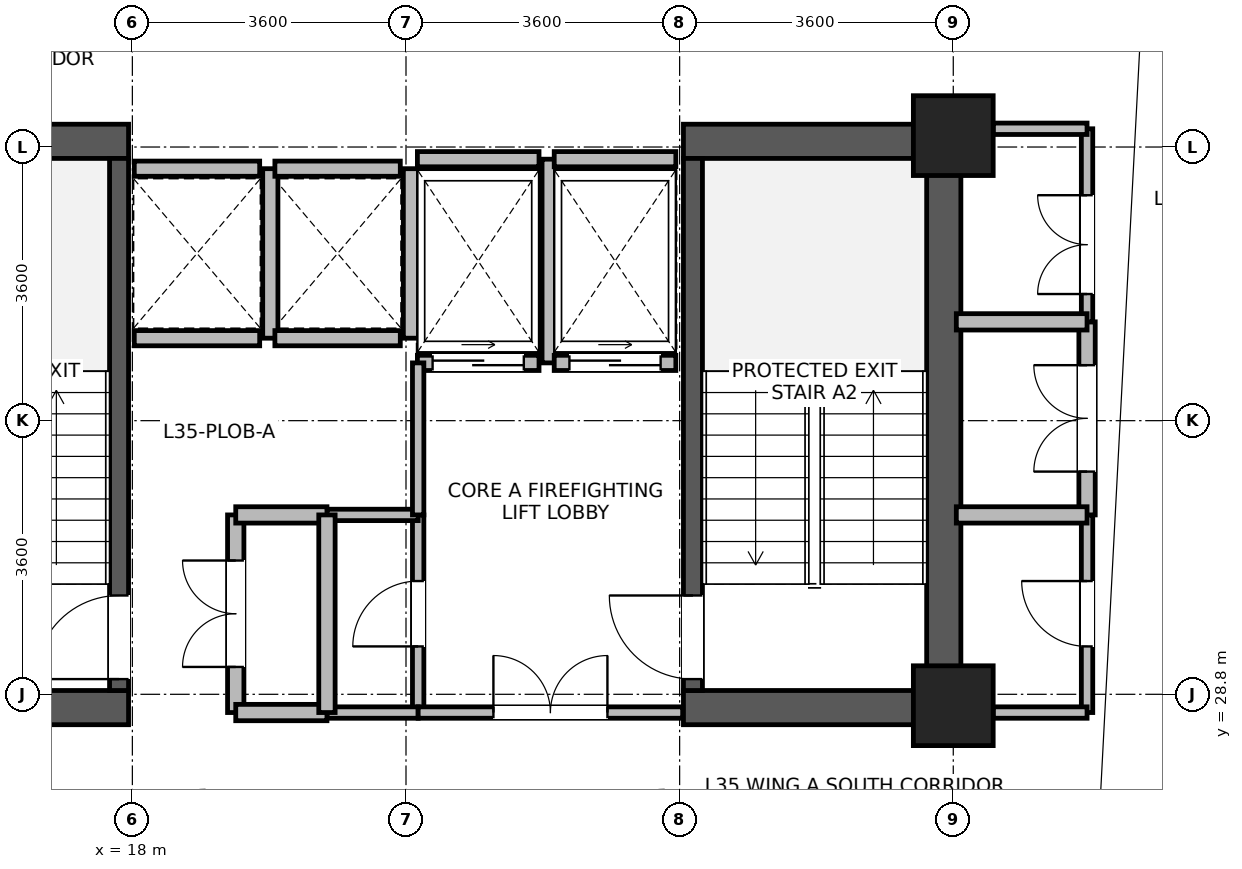
"""IFC4 building model, lengths in metres.
Left out: names, types, materials, properties, quantities, classifications, styles, units other than length and angle.
Written with IfcOpenShell. Run it as: python <this file> out.ifc"""

import sys

from ifc_helpers import new_model, si_unit, direction, frame, frame_2d, origin, origin_2d, place, context, subcontext, project, spatial, rectangle, extrude, source, transform, mapped, element, fill, save


model = new_model("IFC4")
c1 = context("Model", 3, precision=1e-05, world=origin(), true_north=direction((0.0, 1.0)))
c2 = subcontext(c1, "Body", "Model", "MODEL_VIEW")
j1 = project(units=[si_unit("LENGTHUNIT", "METRE"), si_unit("PLANEANGLEUNIT", "RADIAN")], contexts=[c1])
p1 = place(None, origin())
s1 = spatial("IfcSite", under=j1, at=p1, CompositionType="ELEMENT")
p2 = place(p1, origin())
s2 = spatial("IfcBuilding", under=s1, at=p2, CompositionType="ELEMENT")
p3 = place(p2, frame((0.0, 0.0, 140.2)))
s3 = spatial("IfcBuildingStorey", under=s2, at=p3, CompositionType="ELEMENT", Elevation=140.2)
p4 = place(p3, frame((28.675, 28.4, 0.0), z_axis=(0.0, 0.0, 1.0), x_axis=(0.0, 1.0, 0.0)))
e1 = element("IfcWall", 1, at=p4, inside=s3, PredefinedType="SHEAR", context=c2, shape_type="SweptSolid", body=[
    extrude(rectangle(XDim=7.9, YDim=0.45, at=frame_2d((3.95, 0.0))), origin(), (0.0, 0.0, 1.0), 3.46),
])
for number, where, z_axis, x_axis in (
    (2, (14.75, 28.625, 0.0), (0.0, 0.0, 1.0), (1.0, 0.0, 0.0)),
    (3, (25.25, 28.625, 0.0), (0.0, 0.0, 1.0), (1.0, 0.0, 0.0)),
    (4, (14.75, 36.075, 0.0), (0.0, 0.0, 1.0), (1.0, 0.0, 0.0)),
    (5, (25.25, 36.075, 0.0), (0.0, 0.0, 1.0), (1.0, 0.0, 0.0)),
):
    element("IfcWall", number, at=place(p3, frame(where, z_axis=z_axis, x_axis=x_axis)), inside=s3, PredefinedType="SHEAR", context=c2, shape_type="SweptSolid", body=[
        extrude(rectangle(XDim=3.2, YDim=0.45, at=frame_2d((1.6, 0.0))), origin(), (0.0, 0.0, 1.0), 3.46),
    ])
p5 = place(p3, frame((17.825, 28.85, 0.0), z_axis=(0.0, 0.0, 1.0), x_axis=(0.0, 1.0, 0.0)))
e6 = element("IfcWall", 6, at=p5, inside=s3, PredefinedType="SHEAR", context=c2, shape_type="SweptSolid", body=[
    extrude(rectangle(XDim=7.0, YDim=0.25, at=frame_2d((3.5, 0.0))), origin(), (0.0, 0.0, 1.0), 3.46),
])
p6 = place(p5, frame((0.15, 0.0, 0.0)))
e7 = element("IfcOpeningElement", 7, at=p6, cuts=e6, PredefinedType="OPENING", context=c2, shape_type="SweptSolid", body=[
    extrude(rectangle(XDim=1.1, YDim=2.08, at=frame_2d((0.55, 1.04))), frame((0.0, 0.135, 0.0), z_axis=(0.0, -1.0, 0.0), x_axis=(1.0, 0.0, 0.0)), (0.0, 0.0, 1.0), 0.27),
])
p7 = place(p3, frame((25.375, 28.85, 0.0), z_axis=(0.0, 0.0, 1.0), x_axis=(0.0, 1.0, 0.0)))
e8 = element("IfcWall", 8, at=p7, inside=s3, PredefinedType="SHEAR", context=c2, shape_type="SweptSolid", body=[
    extrude(rectangle(XDim=7.0, YDim=0.25, at=frame_2d((3.5, 0.0))), origin(), (0.0, 0.0, 1.0), 3.46),
])
p8 = place(p7, frame((0.15, 0.0, 0.0)))
e9 = element("IfcOpeningElement", 9, at=p8, cuts=e8, PredefinedType="OPENING", context=c2, shape_type="SweptSolid", body=[
    extrude(rectangle(XDim=1.1, YDim=2.08, at=frame_2d((0.55, 1.04))), frame((0.0, 0.135, 0.0), z_axis=(0.0, -1.0, 0.0), x_axis=(1.0, 0.0, 0.0)), (0.0, 0.0, 1.0), 0.27),
])
m1 = source(origin(), c2, "Body", "SweptSolid", [
    extrude(rectangle(XDim=1.05, YDim=1.05, at=origin_2d()), origin(), (0.0, 0.0, 1.0), 3.7),
])
for number, where, z_axis, x_axis in (
    (10, (28.8, 28.65, 0.0), (0.0, 0.0, 1.0), (1.0, 0.0, 0.0)),
    (11, (28.8, 36.15, 0.0), (0.0, 0.0, 1.0), (1.0, 0.0, 0.0)),
):
    element("IfcColumn", number, at=place(p3, frame(where, z_axis=z_axis, x_axis=x_axis)), inside=s3, PredefinedType="COLUMN", context=c2, shape_type="MappedRepresentation", body=[
        mapped(m1, transform((0.0, 0.0, 0.0), x_axis=(1.0, 0.0, 0.0), y_axis=(0.0, 1.0, 0.0), z_axis=(0.0, 0.0, 1.0), scale=1.0)),
    ])
p9 = place(p3, frame((18.025, 33.485, 0.0), z_axis=(0.0, 0.0, 1.0), x_axis=(1.0, 0.0, 0.0)))
e12 = element("IfcWall", 12, at=p9, inside=s3, PredefinedType="PARTITIONING", context=c2, shape_type="SweptSolid", body=[
    extrude(rectangle(XDim=1.65, YDim=0.2, at=frame_2d((0.825, 0.0))), origin(), (0.0, 0.0, 1.0), 3.44),
])
p10 = place(p3, frame((18.025, 35.715, 0.0), z_axis=(0.0, 0.0, 1.0), x_axis=(1.0, 0.0, 0.0)))
e13 = element("IfcWall", 13, at=p10, inside=s3, PredefinedType="PARTITIONING", context=c2, shape_type="SweptSolid", body=[
    extrude(rectangle(XDim=1.65, YDim=0.2, at=frame_2d((0.825, 0.0))), origin(), (0.0, 0.0, 1.0), 2.44),
])
p11 = place(p3, frame((19.815, 33.485, 0.0), z_axis=(0.0, 0.0, 1.0), x_axis=(0.0, 1.0, 0.0)))
e14 = element("IfcWall", 14, at=p11, inside=s3, PredefinedType="PARTITIONING", context=c2, shape_type="SweptSolid", body=[
    extrude(rectangle(XDim=2.23, YDim=0.2, at=frame_2d((1.115, 0.0))), origin(), (0.0, 0.0, 1.0), 3.44),
])
p12 = place(p3, frame((19.875, 33.485, 0.0), z_axis=(0.0, 0.0, 1.0), x_axis=(1.0, 0.0, 0.0)))
e15 = element("IfcWall", 15, at=p12, inside=s3, PredefinedType="PARTITIONING", context=c2, shape_type="SweptSolid", body=[
    extrude(rectangle(XDim=1.65, YDim=0.2, at=frame_2d((0.825, 0.0))), origin(), (0.0, 0.0, 1.0), 3.44),
])
p13 = place(p3, frame((19.875, 35.715, 0.0), z_axis=(0.0, 0.0, 1.0), x_axis=(1.0, 0.0, 0.0)))
e16 = element("IfcWall", 16, at=p13, inside=s3, PredefinedType="PARTITIONING", context=c2, shape_type="SweptSolid", body=[
    extrude(rectangle(XDim=1.65, YDim=0.2, at=frame_2d((0.825, 0.0))), origin(), (0.0, 0.0, 1.0), 2.44),
])
p14 = place(p3, frame((21.665, 33.485, 0.0), z_axis=(0.0, 0.0, 1.0), x_axis=(0.0, 1.0, 0.0)))
e17 = element("IfcWall", 17, at=p14, inside=s3, PredefinedType="PARTITIONING", context=c2, shape_type="SweptSolid", body=[
    extrude(rectangle(XDim=2.23, YDim=0.2, at=frame_2d((1.115, 0.0))), origin(), (0.0, 0.0, 1.0), 3.44),
])
p15 = place(p3, frame((21.75, 33.16, 0.0), z_axis=(0.0, 0.0, 1.0), x_axis=(1.0, 0.0, 0.0)))
e18 = element("IfcWall", 18, at=p15, inside=s3, PredefinedType="PARTITIONING", context=c2, shape_type="SweptSolid", body=[
    extrude(rectangle(XDim=1.6, YDim=0.2, at=frame_2d((0.8, 0.0))), origin(), (0.0, 0.0, 1.0), 3.44),
])
p16 = place(p15, frame((0.2, 0.0, 0.0)))
e19 = element("IfcOpeningElement", 19, at=p16, cuts=e18, PredefinedType="OPENING", context=c2, shape_type="SweptSolid", body=[
    extrude(rectangle(XDim=1.2, YDim=2.12, at=frame_2d((0.6, 1.06))), frame((0.0, 0.11, 0.0), z_axis=(0.0, -1.0, 0.0), x_axis=(1.0, 0.0, 0.0)), (0.0, 0.0, 1.0), 0.22),
])
p17 = place(p3, frame((21.75, 35.84, 0.0), z_axis=(0.0, 0.0, 1.0), x_axis=(1.0, 0.0, 0.0)))
e20 = element("IfcWall", 20, at=p17, inside=s3, PredefinedType="PARTITIONING", context=c2, shape_type="SweptSolid", body=[
    extrude(rectangle(XDim=1.6, YDim=0.2, at=frame_2d((0.8, 0.0))), origin(), (0.0, 0.0, 1.0), 2.44),
])
p18 = place(p3, frame((23.49, 33.16, 0.0), z_axis=(0.0, 0.0, 1.0), x_axis=(0.0, 1.0, 0.0)))
e21 = element("IfcWall", 21, at=p18, inside=s3, PredefinedType="PARTITIONING", context=c2, shape_type="SweptSolid", body=[
    extrude(rectangle(XDim=2.68, YDim=0.2, at=frame_2d((1.34, 0.0))), origin(), (0.0, 0.0, 1.0), 3.44),
])
p19 = place(p3, frame((23.55, 33.16, 0.0), z_axis=(0.0, 0.0, 1.0), x_axis=(1.0, 0.0, 0.0)))
e22 = element("IfcWall", 22, at=p19, inside=s3, PredefinedType="PARTITIONING", context=c2, shape_type="SweptSolid", body=[
    extrude(rectangle(XDim=1.6, YDim=0.2, at=frame_2d((0.8, 0.0))), origin(), (0.0, 0.0, 1.0), 3.44),
])
p20 = place(p19, frame((0.2, 0.0, 0.0)))
e23 = element("IfcOpeningElement", 23, at=p20, cuts=e22, PredefinedType="OPENING", context=c2, shape_type="SweptSolid", body=[
    extrude(rectangle(XDim=1.2, YDim=2.12, at=frame_2d((0.6, 1.06))), frame((0.0, 0.11, 0.0), z_axis=(0.0, -1.0, 0.0), x_axis=(1.0, 0.0, 0.0)), (0.0, 0.0, 1.0), 0.22),
])
p21 = place(p3, frame((23.55, 35.84, 0.0), z_axis=(0.0, 0.0, 1.0), x_axis=(1.0, 0.0, 0.0)))
e24 = element("IfcWall", 24, at=p21, inside=s3, PredefinedType="PARTITIONING", context=c2, shape_type="SweptSolid", body=[
    extrude(rectangle(XDim=1.6, YDim=0.2, at=frame_2d((0.8, 0.0))), origin(), (0.0, 0.0, 1.0), 2.44),
])
p22 = place(p3, frame((19.36, 28.56, 0.0), z_axis=(0.0, 0.0, 1.0), x_axis=(0.0, 1.0, 0.0)))
e25 = element("IfcWall", 25, at=p22, inside=s3, PredefinedType="PARTITIONING", context=c2, shape_type="SweptSolid", body=[
    extrude(rectangle(XDim=2.6, YDim=0.215, at=frame_2d((1.3, 0.0))), origin(), (0.0, 0.0, 1.0), 3.44),
])
p23 = place(p22, frame((0.6, 0.0, 0.0)))
e26 = element("IfcOpeningElement", 26, at=p23, cuts=e25, PredefinedType="OPENING", context=c2, shape_type="SweptSolid", body=[
    extrude(rectangle(XDim=1.4, YDim=2.15, at=frame_2d((0.7, 1.075))), frame((0.0, 0.118, 0.0), z_axis=(0.0, -1.0, 0.0), x_axis=(1.0, 0.0, 0.0)), (0.0, 0.0, 1.0), 0.235),
])
p24 = place(p3, frame((21.76, 28.56, 0.0), z_axis=(0.0, 0.0, 1.0), x_axis=(0.0, 1.0, 0.0)))
e27 = element("IfcWall", 27, at=p24, inside=s3, PredefinedType="PARTITIONING", context=c2, shape_type="SweptSolid", body=[
    extrude(rectangle(XDim=2.6, YDim=0.15, at=frame_2d((1.3, 0.0))), origin(), (0.0, 0.0, 1.0), 3.44),
])
p25 = place(p24, frame((0.87, 0.0, 0.0)))
e28 = element("IfcOpeningElement", 28, at=p25, cuts=e27, PredefinedType="OPENING", context=c2, shape_type="SweptSolid", body=[
    extrude(rectangle(XDim=0.86, YDim=2.02, at=frame_2d((0.43, 1.01))), frame((0.0, 0.085, 0.0), z_axis=(0.0, -1.0, 0.0), x_axis=(1.0, 0.0, 0.0)), (0.0, 0.0, 1.0), 0.17),
])
p26 = place(p3, frame((30.56, 28.56, 0.0), z_axis=(0.0, 0.0, 1.0), x_axis=(0.0, 1.0, 0.0)))
e29 = element("IfcWall", 29, at=p26, inside=s3, PredefinedType="PARTITIONING", context=c2, shape_type="SweptSolid", body=[
    extrude(rectangle(XDim=2.6, YDim=0.15, at=frame_2d((1.3, 0.0))), origin(), (0.0, 0.0, 1.0), 3.44),
])
p27 = place(p26, frame((0.87, 0.0, 0.0)))
e30 = element("IfcOpeningElement", 30, at=p27, cuts=e29, PredefinedType="OPENING", context=c2, shape_type="SweptSolid", body=[
    extrude(rectangle(XDim=0.86, YDim=2.02, at=frame_2d((0.43, 1.01))), frame((0.0, 0.085, 0.0), z_axis=(0.0, -1.0, 0.0), x_axis=(1.0, 0.0, 0.0)), (0.0, 0.0, 1.0), 0.17),
])
p28 = place(p3, frame((30.56, 31.16, 0.0), z_axis=(0.0, 0.0, 1.0), x_axis=(0.0, 1.0, 0.0)))
e31 = element("IfcWall", 31, at=p28, inside=s3, PredefinedType="PARTITIONING", context=c2, shape_type="SweptSolid", body=[
    extrude(rectangle(XDim=2.54, YDim=0.215, at=frame_2d((1.27, 0.0))), origin(), (0.0, 0.0, 1.0), 3.44),
])
p29 = place(p28, frame((0.57, 0.0, 0.0)))
e32 = element("IfcOpeningElement", 32, at=p29, cuts=e31, PredefinedType="OPENING", context=c2, shape_type="SweptSolid", body=[
    extrude(rectangle(XDim=1.4, YDim=2.15, at=frame_2d((0.7, 1.075))), frame((0.0, 0.118, 0.0), z_axis=(0.0, -1.0, 0.0), x_axis=(1.0, 0.0, 0.0)), (0.0, 0.0, 1.0), 0.235),
])
p30 = place(p3, frame((30.56, 33.7, 0.0), z_axis=(0.0, 0.0, 1.0), x_axis=(0.0, 1.0, 0.0)))
e33 = element("IfcWall", 33, at=p30, inside=s3, PredefinedType="PARTITIONING", context=c2, shape_type="SweptSolid", body=[
    extrude(rectangle(XDim=2.54, YDim=0.15, at=frame_2d((1.27, 0.0))), origin(), (0.0, 0.0, 1.0), 3.44),
])
p31 = place(p30, frame((0.366, 0.0, 0.0)))
e34 = element("IfcOpeningElement", 34, at=p31, cuts=e33, PredefinedType="OPENING", context=c2, shape_type="SweptSolid", body=[
    extrude(rectangle(XDim=1.3, YDim=2.12, at=frame_2d((0.65, 1.06))), frame((0.0, 0.085, 0.0), z_axis=(0.0, -1.0, 0.0), x_axis=(1.0, 0.0, 0.0)), (0.0, 0.0, 1.0), 0.17),
])
for number, where, z_axis, x_axis in (
    (35, (29.325, 28.56, 0.0), (0.0, 0.0, 1.0), (1.0, 0.0, 0.0)),
    (36, (29.325, 36.24, 0.0), (0.0, 0.0, 1.0), (1.0, 0.0, 0.0)),
):
    element("IfcWall", number, at=place(p3, frame(where, z_axis=z_axis, x_axis=x_axis)), inside=s3, PredefinedType="PARTITIONING", context=c2, shape_type="SweptSolid", body=[
        extrude(rectangle(XDim=1.235, YDim=0.15, at=frame_2d((0.618, 0.0))), origin(), (0.0, 0.0, 1.0), 2.84),
    ])
p32 = place(p3, frame((20.56, 28.56, 0.0), z_axis=(0.0, 0.0, 1.0), x_axis=(1.0, 0.0, 0.0)))
e37 = element("IfcWall", 37, at=p32, inside=s3, PredefinedType="PARTITIONING", context=c2, shape_type="SweptSolid", body=[
    extrude(rectangle(XDim=1.2, YDim=0.15, at=frame_2d((0.6, 0.0))), origin(), (0.0, 0.0, 1.0), 2.44),
])
p33 = place(p3, frame((20.56, 31.16, 0.0), z_axis=(0.0, 0.0, 1.0), x_axis=(1.0, 0.0, 0.0)))
e38 = element("IfcWall", 38, at=p33, inside=s3, PredefinedType="PARTITIONING", context=c2, shape_type="SweptSolid", body=[
    extrude(rectangle(XDim=1.2, YDim=0.15, at=frame_2d((0.6, 0.0))), origin(), (0.0, 0.0, 1.0), 3.44),
])
p34 = place(p3, frame((19.36, 28.56, 0.0), z_axis=(0.0, 0.0, 1.0), x_axis=(1.0, 0.0, 0.0)))
e39 = element("IfcWall", 39, at=p34, inside=s3, PredefinedType="PARTITIONING", context=c2, shape_type="SweptSolid", body=[
    extrude(rectangle(XDim=1.2, YDim=0.215, at=frame_2d((0.6, 0.0))), origin(), (0.0, 0.0, 1.0), 2.44),
])
p35 = place(p3, frame((19.36, 31.16, 0.0), z_axis=(0.0, 0.0, 1.0), x_axis=(1.0, 0.0, 0.0)))
e40 = element("IfcWall", 40, at=p35, inside=s3, PredefinedType="PARTITIONING", context=c2, shape_type="SweptSolid", body=[
    extrude(rectangle(XDim=1.2, YDim=0.215, at=frame_2d((0.6, 0.0))), origin(), (0.0, 0.0, 1.0), 3.44),
])
p36 = place(p3, frame((21.76, 28.56, 0.0), z_axis=(0.0, 0.0, 1.0), x_axis=(1.0, 0.0, 0.0)))
e41 = element("IfcWall", 41, at=p36, inside=s3, PredefinedType="PARTITIONING", context=c2, shape_type="SweptSolid", body=[
    extrude(rectangle(XDim=3.48, YDim=0.15, at=frame_2d((1.74, 0.0))), origin(), (0.0, 0.0, 1.0), 2.44),
])
p37 = place(p36, frame((0.99, 0.0, 0.0)))
e42 = element("IfcOpeningElement", 42, at=p37, cuts=e41, PredefinedType="OPENING", context=c2, shape_type="SweptSolid", body=[
    extrude(rectangle(XDim=1.5, YDim=2.1, at=frame_2d((0.75, 1.05))), frame((0.0, 0.085, 0.0), z_axis=(0.0, -1.0, 0.0), x_axis=(1.0, 0.0, 0.0)), (0.0, 0.0, 1.0), 0.17),
])
p38 = place(p3, frame((20.56, 28.56, 0.0), z_axis=(0.0, 0.0, 1.0), x_axis=(0.0, 1.0, 0.0)))
e43 = element("IfcWall", 43, at=p38, inside=s3, PredefinedType="PARTITIONING", context=c2, shape_type="SweptSolid", body=[
    extrude(rectangle(XDim=2.6, YDim=0.215, at=frame_2d((1.3, 0.0))), origin(), (0.0, 0.0, 1.0), 3.44),
])
p39 = place(p3, frame((21.76, 31.16, 0.0), z_axis=(0.0, 0.0, 1.0), x_axis=(0.0, 1.0, 0.0)))
e44 = element("IfcWall", 44, at=p39, inside=s3, PredefinedType="PARTITIONING", context=c2, shape_type="SweptSolid", body=[
    extrude(rectangle(XDim=2.0, YDim=0.15, at=frame_2d((1.0, 0.0))), origin(), (0.0, 0.0, 1.0), 3.44),
])
for number, where, z_axis, x_axis in (
    (45, (28.84, 31.16, 0.0), (0.0, 0.0, 1.0), (1.0, 0.0, 0.0)),
    (46, (28.84, 33.7, 0.0), (0.0, 0.0, 1.0), (1.0, 0.0, 0.0)),
):
    element("IfcWall", number, at=place(p3, frame(where, z_axis=z_axis, x_axis=x_axis)), inside=s3, PredefinedType="PARTITIONING", context=c2, shape_type="SweptSolid", body=[
        extrude(rectangle(XDim=1.72, YDim=0.215, at=frame_2d((0.86, 0.0))), origin(), (0.0, 0.0, 1.0), 3.44),
    ])
p40 = place(p6, origin())
e47 = element("IfcDoor", 47, at=p40, inside=s3, OperationType="SINGLE_SWING_LEFT", PredefinedType="DOOR", context=c2, shape_type="SweptSolid", body=[
    extrude(rectangle(XDim=1.1, YDim=2.08, at=frame_2d((0.55, 1.04))), frame((0.0, 0.025, 0.0), z_axis=(0.0, -1.0, 0.0), x_axis=(1.0, 0.0, 0.0)), (0.0, 0.0, 1.0), 0.05),
])
fill(e7, e47)
p41 = place(p8, origin())
e48 = element("IfcDoor", 48, at=p41, inside=s3, OperationType="SINGLE_SWING_RIGHT", PredefinedType="DOOR", context=c2, shape_type="SweptSolid", body=[
    extrude(rectangle(XDim=1.1, YDim=2.08, at=frame_2d((0.55, 1.04))), frame((0.0, 0.025, 0.0), z_axis=(0.0, -1.0, 0.0), x_axis=(1.0, 0.0, 0.0)), (0.0, 0.0, 1.0), 0.05),
])
fill(e9, e48)
p42 = place(p16, origin())
e49 = element("IfcDoor", 49, at=p42, inside=s3, OperationType="SLIDING_TO_RIGHT", PredefinedType="DOOR", context=c2, shape_type="SweptSolid", body=[
    extrude(rectangle(XDim=1.2, YDim=2.12, at=frame_2d((0.6, 1.06))), frame((0.0, 0.025, 0.0), z_axis=(0.0, -1.0, 0.0), x_axis=(1.0, 0.0, 0.0)), (0.0, 0.0, 1.0), 0.05),
])
fill(e19, e49)
p43 = place(p20, origin())
e50 = element("IfcDoor", 50, at=p43, inside=s3, OperationType="SLIDING_TO_RIGHT", PredefinedType="DOOR", context=c2, shape_type="SweptSolid", body=[
    extrude(rectangle(XDim=1.2, YDim=2.12, at=frame_2d((0.6, 1.06))), frame((0.0, 0.025, 0.0), z_axis=(0.0, -1.0, 0.0), x_axis=(1.0, 0.0, 0.0)), (0.0, 0.0, 1.0), 0.05),
])
fill(e23, e50)
p44 = place(p23, origin())
e51 = element("IfcDoor", 51, at=p44, inside=s3, OperationType="DOUBLE_DOOR_SINGLE_SWING", PredefinedType="DOOR", context=c2, shape_type="SweptSolid", body=[
    extrude(rectangle(XDim=1.4, YDim=2.15, at=frame_2d((0.7, 1.075))), frame((0.0, 0.025, 0.0), z_axis=(0.0, -1.0, 0.0), x_axis=(1.0, 0.0, 0.0)), (0.0, 0.0, 1.0), 0.05),
])
fill(e26, e51)
p45 = place(p25, origin())
e52 = element("IfcDoor", 52, at=p45, inside=s3, OperationType="SINGLE_SWING_LEFT", PredefinedType="DOOR", context=c2, shape_type="SweptSolid", body=[
    extrude(rectangle(XDim=0.86, YDim=2.02, at=frame_2d((0.43, 1.01))), frame((0.0, 0.025, 0.0), z_axis=(0.0, -1.0, 0.0), x_axis=(1.0, 0.0, 0.0)), (0.0, 0.0, 1.0), 0.05),
])
fill(e28, e52)
p46 = place(p27, origin())
e53 = element("IfcDoor", 53, at=p46, inside=s3, OperationType="SINGLE_SWING_RIGHT", PredefinedType="DOOR", context=c2, shape_type="SweptSolid", body=[
    extrude(rectangle(XDim=0.86, YDim=2.02, at=frame_2d((0.43, 1.01))), frame((0.0, 0.025, 0.0), z_axis=(0.0, -1.0, 0.0), x_axis=(1.0, 0.0, 0.0)), (0.0, 0.0, 1.0), 0.05),
])
fill(e30, e53)
p47 = place(p29, origin())
e54 = element("IfcDoor", 54, at=p47, inside=s3, OperationType="DOUBLE_DOOR_SINGLE_SWING", PredefinedType="DOOR", context=c2, shape_type="SweptSolid", body=[
    extrude(rectangle(XDim=1.4, YDim=2.15, at=frame_2d((0.7, 1.075))), frame((0.0, 0.025, 0.0), z_axis=(0.0, -1.0, 0.0), x_axis=(1.0, 0.0, 0.0)), (0.0, 0.0, 1.0), 0.05),
])
fill(e32, e54)
p48 = place(p31, origin())
e55 = element("IfcDoor", 55, at=p48, inside=s3, OperationType="DOUBLE_DOOR_SINGLE_SWING", PredefinedType="DOOR", context=c2, shape_type="SweptSolid", body=[
    extrude(rectangle(XDim=1.3, YDim=2.12, at=frame_2d((0.65, 1.06))), frame((0.0, 0.025, 0.0), z_axis=(0.0, -1.0, 0.0), x_axis=(1.0, 0.0, 0.0)), (0.0, 0.0, 1.0), 0.05),
])
fill(e34, e55)
p49 = place(p37, origin())
e56 = element("IfcDoor", 56, at=p49, inside=s3, OperationType="DOUBLE_DOOR_SINGLE_SWING", PredefinedType="DOOR", context=c2, shape_type="SweptSolid", body=[
    extrude(rectangle(XDim=1.5, YDim=2.1, at=frame_2d((0.75, 1.05))), frame((0.0, 0.025, 0.0), z_axis=(0.0, -1.0, 0.0), x_axis=(1.0, 0.0, 0.0)), (0.0, 0.0, 1.0), 0.05),
])
fill(e42, e56)
save(model, sys.argv[1])
